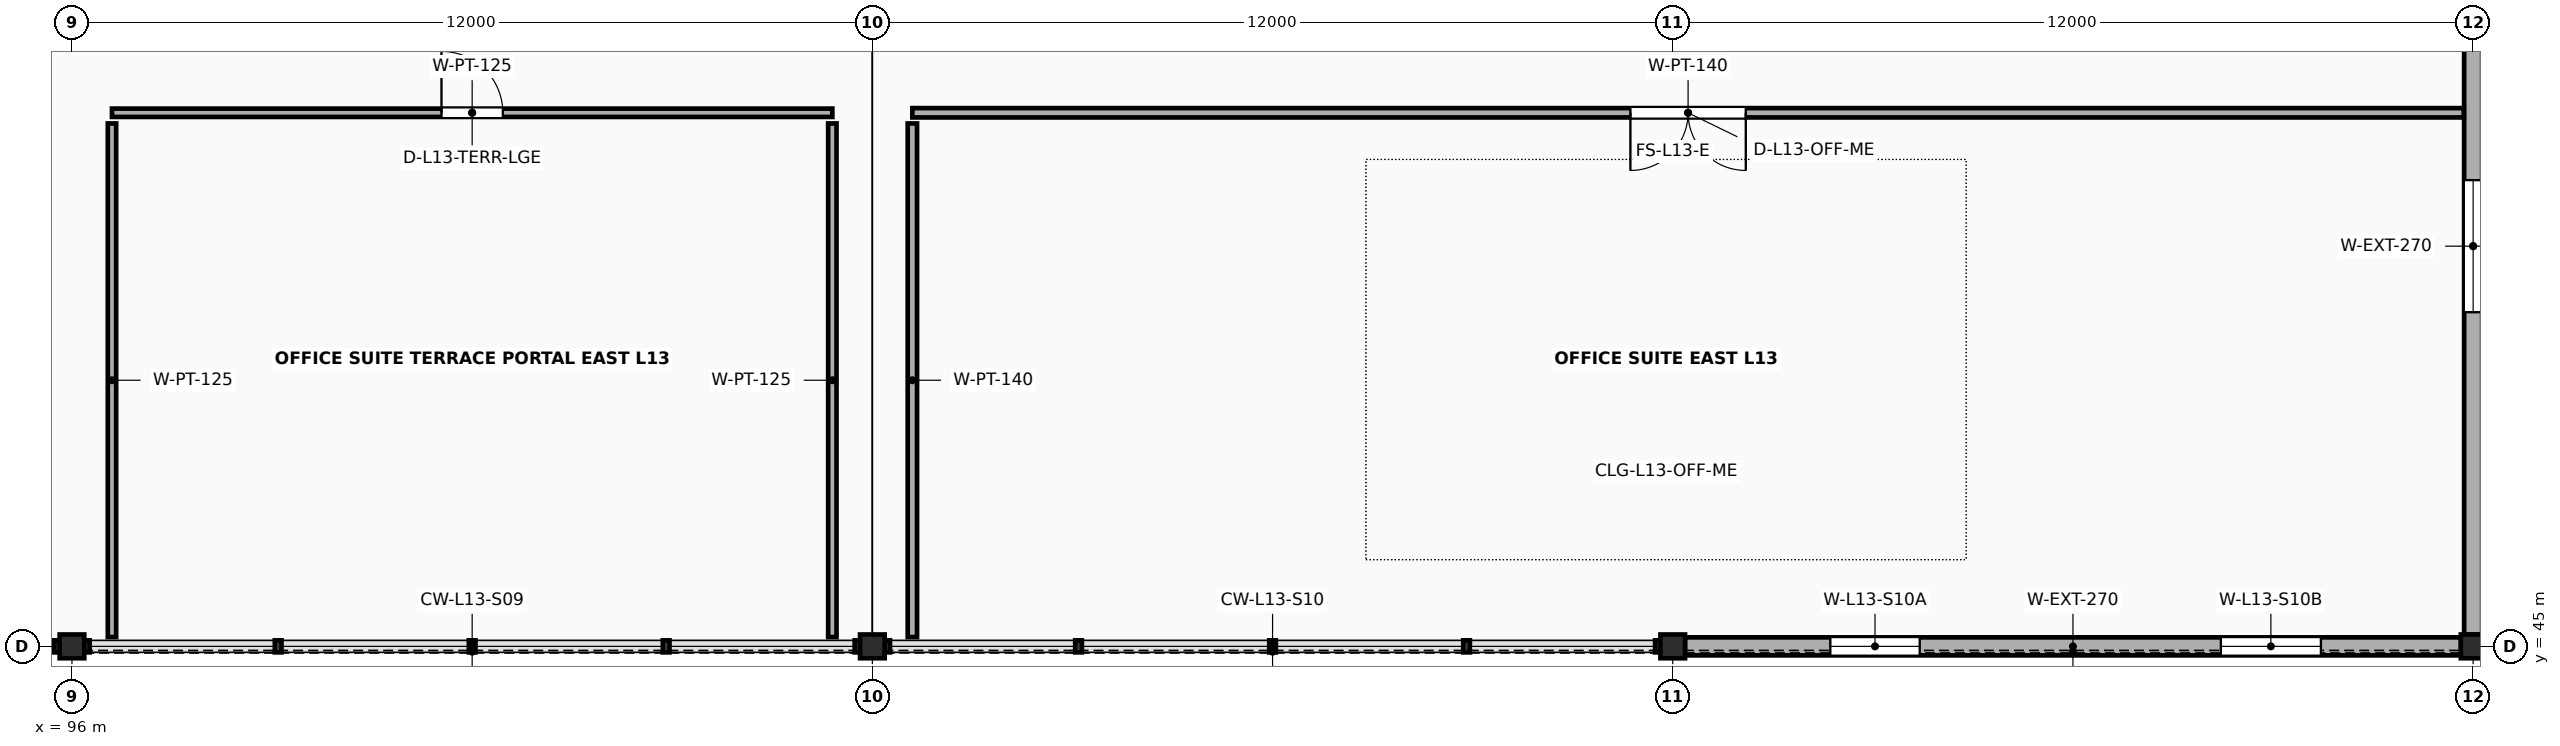
"""IFC4 building model, lengths in metres.
Left out: names, types, materials, properties, quantities, classifications, styles, units other than length and angle.
Written with IfcOpenShell. Run it as: python <this file> out.ifc"""

import sys

from ifc_helpers import new_model, si_unit, direction, frame, frame_2d, origin, origin_2d, place, context, subcontext, project, spatial, rectangle, i_section, extrude, element, fill, save


model = new_model("IFC4")
c1 = context("Model", 3, precision=1e-05, world=origin(), true_north=direction((0.0, 1.0)))
c2 = subcontext(c1, "Body", "Model", "MODEL_VIEW")
j1 = project(units=[si_unit("LENGTHUNIT", "METRE"), si_unit("PLANEANGLEUNIT", "RADIAN")], contexts=[c1])
p1 = place(None, origin())
s1 = spatial("IfcSite", under=j1, at=p1, CompositionType="ELEMENT")
p2 = place(p1, origin())
s2 = spatial("IfcBuilding", under=s1, at=p2, CompositionType="ELEMENT")
p3 = place(p2, frame((0.0, 0.0, 53.6)))
s3 = spatial("IfcBuildingStorey", under=s2, at=p3, CompositionType="ELEMENT", Elevation=53.6)
for number, where, z_axis, x_axis in (
    (1, (96.0, 45.0, 0.0), (0.0, 0.0, 1.0), (1.0, 0.0, 0.0)),
    (2, (108.0, 45.0, 0.0), (0.0, 0.0, 1.0), (1.0, 0.0, 0.0)),
    (3, (120.0, 45.0, 0.0), (0.0, 0.0, 1.0), (1.0, 0.0, 0.0)),
    (4, (132.0, 45.0, 0.0), (0.0, 0.0, 1.0), (1.0, 0.0, 0.0)),
):
    element("IfcColumn", number, at=place(p3, frame(where, z_axis=z_axis, x_axis=x_axis)), inside=s3, PredefinedType="COLUMN", context=c2, shape_type="SweptSolid", body=[
        extrude(i_section(OverallWidth=0.369, OverallDepth=0.356, WebThickness=0.011, FlangeThickness=0.018, FilletRadius=0.018, at=origin_2d()), origin(), (0.0, 0.0, 1.0), 4.0),
    ])
p4 = place(p3, frame((120.183, 45.0, 0.0), z_axis=(0.0, 0.0, 1.0), x_axis=(1.0, 0.0, 0.0)))
e5 = element("IfcWall", 5, at=p4, inside=s3, PredefinedType="SOLIDWALL", context=c2, shape_type="SweptSolid", body=[
    extrude(rectangle(XDim=11.635, YDim=0.27, at=frame_2d((5.817, 0.0))), origin(), (0.0, 0.0, 1.0), 3.271),
])
p5 = place(p4, frame((2.18, 0.0, 0.78)))
e6 = element("IfcOpeningElement", 6, at=p5, cuts=e5, PredefinedType="OPENING", context=c2, shape_type="SweptSolid", body=[
    extrude(rectangle(XDim=1.34, YDim=1.58, at=frame_2d((0.67, 0.79))), frame((0.0, 0.15, 0.0), z_axis=(0.0, -1.0, 0.0), x_axis=(1.0, 0.0, 0.0)), (0.0, 0.0, 1.0), 0.3),
])
p6 = place(p4, frame((8.035, 0.0, 0.78)))
e7 = element("IfcOpeningElement", 7, at=p6, cuts=e5, PredefinedType="OPENING", context=c2, shape_type="SweptSolid", body=[
    extrude(rectangle(XDim=1.5, YDim=1.58, at=frame_2d((0.75, 0.79))), frame((0.0, 0.15, 0.0), z_axis=(0.0, -1.0, 0.0), x_axis=(1.0, 0.0, 0.0)), (0.0, 0.0, 1.0), 0.3),
])
p7 = place(p3, frame((132.0, 45.176, 0.0), z_axis=(0.0, 0.0, 1.0), x_axis=(0.0, 1.0, 0.0)))
e8 = element("IfcWall", 8, at=p7, inside=s3, PredefinedType="SOLIDWALL", context=c2, shape_type="SweptSolid", body=[
    extrude(rectangle(XDim=11.648, YDim=0.27, at=frame_2d((5.824, 0.0))), origin(), (0.0, 0.0, 1.0), 3.271),
])
p8 = place(p7, frame((4.834, 0.0, 0.78)))
e9 = element("IfcOpeningElement", 9, at=p8, cuts=e8, PredefinedType="OPENING", context=c2, shape_type="SweptSolid", body=[
    extrude(rectangle(XDim=1.98, YDim=1.58, at=frame_2d((0.99, 0.79))), frame((0.0, 0.15, 0.0), z_axis=(0.0, -1.0, 0.0), x_axis=(1.0, 0.0, 0.0)), (0.0, 0.0, 1.0), 0.3),
])
p9 = place(p3, frame((96.6, 53.0, 0.0), z_axis=(0.0, 0.0, 1.0), x_axis=(1.0, 0.0, 0.0)))
e10 = element("IfcWall", 10, at=p9, inside=s3, PredefinedType="PARTITIONING", context=c2, shape_type="SweptSolid", body=[
    extrude(rectangle(XDim=10.8, YDim=0.125, at=frame_2d((5.4, 0.0))), origin(), (0.0, 0.0, 1.0), 2.88),
])
p10 = place(p9, frame((4.94, 0.0, 0.0)))
e11 = element("IfcOpeningElement", 11, at=p10, cuts=e10, PredefinedType="OPENING", context=c2, shape_type="SweptSolid", body=[
    extrude(rectangle(XDim=0.92, YDim=2.1, at=frame_2d((0.46, 1.05))), frame((0.0, 0.077, 0.0), z_axis=(0.0, -1.0, 0.0), x_axis=(1.0, 0.0, 0.0)), (0.0, 0.0, 1.0), 0.155),
])
for number, where, z_axis, x_axis in (
    (12, (96.6, 45.14, 0.0), (0.0, 0.0, 1.0), (0.0, 1.0, 0.0)),
    (13, (107.4, 45.14, 0.0), (0.0, 0.0, 1.0), (0.0, 1.0, 0.0)),
):
    element("IfcWall", number, at=place(p3, frame(where, z_axis=z_axis, x_axis=x_axis)), inside=s3, PredefinedType="PARTITIONING", context=c2, shape_type="SweptSolid", body=[
        extrude(rectangle(XDim=7.7, YDim=0.125, at=frame_2d((3.85, 0.0))), origin(), (0.0, 0.0, 1.0), 2.88),
    ])
p11 = place(p3, frame((108.6, 53.0, 0.0), z_axis=(0.0, 0.0, 1.0), x_axis=(1.0, 0.0, 0.0)))
e14 = element("IfcWall", 14, at=p11, inside=s3, PredefinedType="PARTITIONING", context=c2, shape_type="SweptSolid", body=[
    extrude(rectangle(XDim=23.26, YDim=0.14, at=frame_2d((11.63, 0.0))), origin(), (0.0, 0.0, 1.0), 2.88),
])
p12 = place(p11, frame((10.765, 0.0, 0.0)))
e15 = element("IfcOpeningElement", 15, at=p12, cuts=e14, PredefinedType="OPENING", context=c2, shape_type="SweptSolid", body=[
    extrude(rectangle(XDim=1.73, YDim=2.37, at=frame_2d((0.865, 1.185))), frame((0.0, 0.085, 0.0), z_axis=(0.0, -1.0, 0.0), x_axis=(1.0, 0.0, 0.0)), (0.0, 0.0, 1.0), 0.17),
])
p13 = place(p3, frame((108.6, 45.14, 0.0), z_axis=(0.0, 0.0, 1.0), x_axis=(0.0, 1.0, 0.0)))
e16 = element("IfcWall", 16, at=p13, inside=s3, PredefinedType="PARTITIONING", context=c2, shape_type="SweptSolid", body=[
    extrude(rectangle(XDim=7.7, YDim=0.14, at=frame_2d((3.85, 0.0))), origin(), (0.0, 0.0, 1.0), 2.88),
])
p14 = place(p5, origin())
e17 = element("IfcWindow", 17, at=p14, inside=s3, PartitioningType="SINGLE_PANEL", PredefinedType="WINDOW", context=c2, shape_type="SweptSolid", body=[
    extrude(rectangle(XDim=1.34, YDim=1.58, at=frame_2d((0.67, 0.79))), frame((0.0, 0.03, 0.0), z_axis=(0.0, -1.0, 0.0), x_axis=(1.0, 0.0, 0.0)), (0.0, 0.0, 1.0), 0.06),
])
fill(e6, e17)
p15 = place(p6, origin())
e18 = element("IfcWindow", 18, at=p15, inside=s3, PartitioningType="SINGLE_PANEL", PredefinedType="WINDOW", context=c2, shape_type="SweptSolid", body=[
    extrude(rectangle(XDim=1.5, YDim=1.58, at=frame_2d((0.75, 0.79))), frame((0.0, 0.03, 0.0), z_axis=(0.0, -1.0, 0.0), x_axis=(1.0, 0.0, 0.0)), (0.0, 0.0, 1.0), 0.06),
])
fill(e7, e18)
p16 = place(p8, origin())
e19 = element("IfcWindow", 19, at=p16, inside=s3, PartitioningType="DOUBLE_PANEL_VERTICAL", PredefinedType="WINDOW", context=c2, shape_type="SweptSolid", body=[
    extrude(rectangle(XDim=1.98, YDim=1.58, at=frame_2d((0.99, 0.79))), frame((0.0, 0.03, 0.0), z_axis=(0.0, -1.0, 0.0), x_axis=(1.0, 0.0, 0.0)), (0.0, 0.0, 1.0), 0.06),
])
fill(e9, e19)
p17 = place(p10, origin())
e20 = element("IfcDoor", 20, at=p17, inside=s3, OperationType="SINGLE_SWING_LEFT", PredefinedType="DOOR", context=c2, shape_type="SweptSolid", body=[
    extrude(rectangle(XDim=0.92, YDim=2.1, at=frame_2d((0.46, 1.05))), frame((0.0, 0.025, 0.0), z_axis=(0.0, -1.0, 0.0), x_axis=(1.0, 0.0, 0.0)), (0.0, 0.0, 1.0), 0.05),
])
fill(e11, e20)
p18 = place(p12, origin())
e21 = element("IfcDoor", 21, at=p18, inside=s3, OperationType="DOUBLE_DOOR_SINGLE_SWING", PredefinedType="DOOR", context=c2, shape_type="SweptSolid", body=[
    extrude(rectangle(XDim=1.73, YDim=2.37, at=frame_2d((0.865, 1.185))), frame((0.0, 0.025, 0.0), z_axis=(0.0, -1.0, 0.0), x_axis=(1.0, 0.0, 0.0)), (0.0, 0.0, 1.0), 0.05),
])
fill(e15, e21)
save(model, sys.argv[1])
